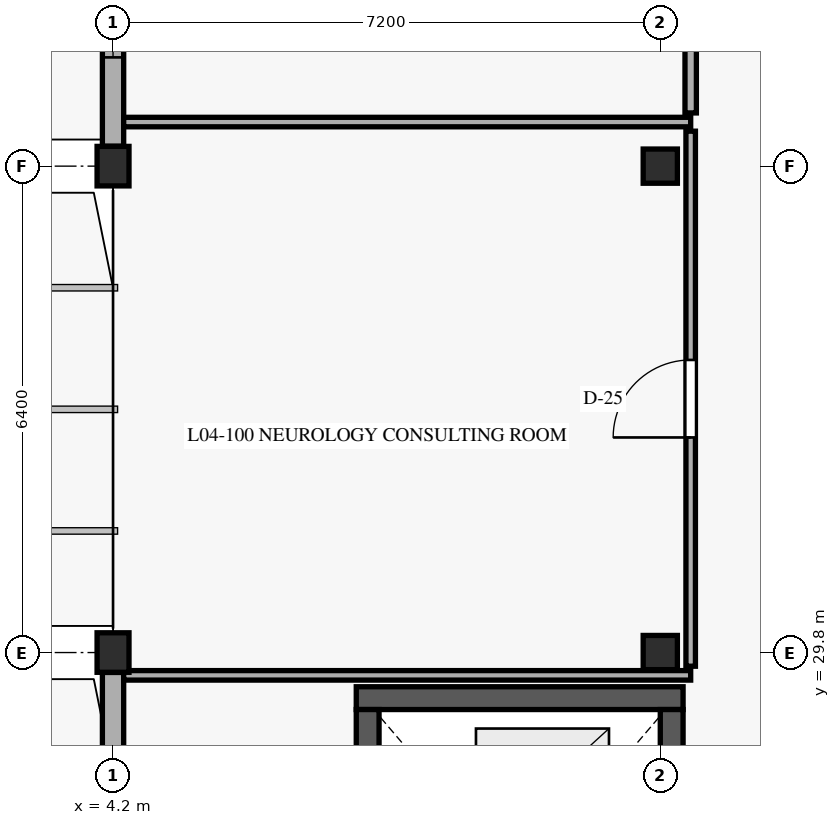
"""IFC4 building model, lengths in metres.
Left out: names, types, materials, properties, quantities, classifications, styles, units other than length and angle.
Written with IfcOpenShell. Run it as: python <this file> out.ifc"""

import sys

from ifc_helpers import new_model, si_unit, direction, frame, frame_2d, origin, origin_with_axes, origin_2d, place, context, subcontext, project, spatial, rectangle, extrude, element, fill, save


model = new_model("IFC4")
c1 = context("Model", 3, precision=1e-05, world=origin(), true_north=direction((0.0, 1.0)))
c2 = subcontext(c1, "Body", "Model", "MODEL_VIEW")
j1 = project(units=[si_unit("LENGTHUNIT", "METRE"), si_unit("PLANEANGLEUNIT", "RADIAN")], contexts=[c1])
p1 = place(None, origin())
s1 = spatial("IfcSite", under=j1, at=p1, CompositionType="ELEMENT")
p2 = place(p1, origin())
s2 = spatial("IfcBuilding", under=s1, at=p2, CompositionType="ELEMENT")
p3 = place(p2, frame((0.0, 0.0, 13.5)))
s3 = spatial("IfcBuildingStorey", under=s2, at=p3, CompositionType="ELEMENT", Elevation=13.5)
for number, where, z_axis, x_axis in (
    (1, (4.2, 29.8, 0.0), (0.0, 0.0, 1.0), (1.0, 0.0, 0.0)),
    (2, (4.2, 36.2, 0.0), (0.0, 0.0, 1.0), (1.0, 0.0, 0.0)),
):
    element("IfcColumn", number, at=place(p3, frame(where, z_axis=z_axis, x_axis=x_axis)), inside=s3, PredefinedType="COLUMN", context=c2, shape_type="SweptSolid", body=[
        extrude(rectangle(XDim=0.42, YDim=0.52, at=origin_2d()), origin(), (0.0, 0.0, 1.0), 4.05),
    ])
for number, where, z_axis, x_axis in (
    (3, (11.4, 29.8, 0.0), (0.0, 0.0, 1.0), (1.0, 0.0, 0.0)),
    (4, (11.4, 36.2, 0.0), (0.0, 0.0, 1.0), (1.0, 0.0, 0.0)),
):
    element("IfcColumn", number, at=place(p3, frame(where, z_axis=z_axis, x_axis=x_axis)), inside=s3, PredefinedType="COLUMN", context=c2, shape_type="SweptSolid", body=[
        extrude(rectangle(XDim=0.45, YDim=0.45, at=origin_2d()), origin(), (0.0, 0.0, 1.0), 4.05),
    ])
p4 = place(p3, frame((11.7, 29.2, 0.0), z_axis=(0.0, 0.0, 1.0), x_axis=(-1.0, 0.0, 0.0)))
e5 = element("IfcWall", 5, at=p4, inside=s3, PredefinedType="SHEAR", context=c2, shape_type="SweptSolid", body=[
    extrude(rectangle(XDim=4.3, YDim=0.3, at=frame_2d((2.15, 0.0))), origin(), (0.0, 0.0, 1.0), 3.75),
])
p5 = place(p3, frame((7.55, 29.05, 0.0), z_axis=(0.0, 0.0, 1.0), x_axis=(0.0, -1.0, 0.0)))
e6 = element("IfcWall", 6, at=p5, inside=s3, PredefinedType="SHEAR", context=c2, shape_type="SweptSolid", body=[
    extrude(rectangle(XDim=11.7, YDim=0.3, at=frame_2d((5.85, 0.0))), origin(), (0.0, 0.0, 1.0), 3.75),
])
p6 = place(p3, frame((11.55, 17.35, 0.0), z_axis=(0.0, 0.0, 1.0), x_axis=(0.0, 1.0, 0.0)))
e7 = element("IfcWall", 7, at=p6, inside=s3, PredefinedType="SHEAR", context=c2, shape_type="SweptSolid", body=[
    extrude(rectangle(XDim=11.7, YDim=0.3, at=frame_2d((5.85, 0.0))), origin(), (0.0, 0.0, 1.0), 3.75),
])
p7 = place(p6, frame((0.2, 0.0, 0.0)))
e8 = element("IfcOpeningElement", 8, at=p7, cuts=e7, PredefinedType="OPENING", context=c2, shape_type="SweptSolid", body=[
    extrude(rectangle(XDim=1.1, YDim=2.2, at=frame_2d((0.55, 1.1))), frame((0.0, 0.16, 0.0), z_axis=(0.0, -1.0, 0.0), x_axis=(1.0, 0.0, 0.0)), (0.0, 0.0, 1.0), 0.32),
])
p8 = place(p6, frame((7.875, 0.0, 0.0)))
e9 = element("IfcOpeningElement", 9, at=p8, cuts=e7, PredefinedType="OPENING", context=c2, shape_type="SweptSolid", body=[
    extrude(rectangle(XDim=1.15, YDim=2.2, at=frame_2d((0.575, 1.1))), frame((0.0, 0.16, 0.0), z_axis=(0.0, -1.0, 0.0), x_axis=(1.0, 0.0, 0.0)), (0.0, 0.0, 1.0), 0.32),
])
p9 = place(p6, frame((10.14, 0.0, 0.0)))
e10 = element("IfcOpeningElement", 10, at=p9, cuts=e7, PredefinedType="OPENING", context=c2, shape_type="SweptSolid", body=[
    extrude(rectangle(XDim=1.02, YDim=2.15, at=frame_2d((0.51, 1.075))), frame((0.0, 0.16, 0.0), z_axis=(0.0, -1.0, 0.0), x_axis=(1.0, 0.0, 0.0)), (0.0, 0.0, 1.0), 0.32),
])
p10 = place(p3, frame((4.2, 29.538, 0.0), z_axis=(0.0, 0.0, 1.0), x_axis=(0.0, -1.0, 0.0)))
e11 = element("IfcWall", 11, at=p10, inside=s3, PredefinedType="SOLIDWALL", context=c2, shape_type="SweptSolid", body=[
    extrude(rectangle(XDim=5.876, YDim=0.28, at=frame_2d((2.938, 0.0))), origin(), (0.0, 0.0, 1.0), 3.33),
])
p11 = place(p10, frame((1.034, 0.0, 0.88)))
e12 = element("IfcOpeningElement", 12, at=p11, cuts=e11, PredefinedType="OPENING", context=c2, shape_type="SweptSolid", body=[
    extrude(rectangle(XDim=1.85, YDim=1.65, at=frame_2d((0.925, 0.825))), frame((0.0, 0.15, 0.0), z_axis=(0.0, -1.0, 0.0), x_axis=(1.0, 0.0, 0.0)), (0.0, 0.0, 1.0), 0.3),
])
p12 = place(p10, frame((3.207, 0.0, 0.88)))
e13 = element("IfcOpeningElement", 13, at=p12, cuts=e11, PredefinedType="OPENING", context=c2, shape_type="SweptSolid", body=[
    extrude(rectangle(XDim=1.42, YDim=1.9, at=frame_2d((0.71, 0.95))), frame((0.0, 0.15, 0.0), z_axis=(0.0, -1.0, 0.0), x_axis=(1.0, 0.0, 0.0)), (0.0, 0.0, 1.0), 0.3),
])
p13 = place(p3, frame((4.2, 42.338, 0.0), z_axis=(0.0, 0.0, 1.0), x_axis=(0.0, -1.0, 0.0)))
e14 = element("IfcWall", 14, at=p13, inside=s3, PredefinedType="SOLIDWALL", context=c2, shape_type="SweptSolid", body=[
    extrude(rectangle(XDim=5.876, YDim=0.28, at=frame_2d((2.938, 0.0))), origin(), (0.0, 0.0, 1.0), 3.33),
])
p14 = place(p13, frame((1.534, 0.0, 0.88)))
e15 = element("IfcOpeningElement", 15, at=p14, cuts=e14, PredefinedType="OPENING", context=c2, shape_type="SweptSolid", body=[
    extrude(rectangle(XDim=0.85, YDim=2.1, at=frame_2d((0.425, 1.05))), frame((0.0, 0.15, 0.0), z_axis=(0.0, -1.0, 0.0), x_axis=(1.0, 0.0, 0.0)), (0.0, 0.0, 1.0), 0.3),
])
p15 = place(p13, frame((3.127, 0.0, 0.88)))
e16 = element("IfcOpeningElement", 16, at=p15, cuts=e14, PredefinedType="OPENING", context=c2, shape_type="SweptSolid", body=[
    extrude(rectangle(XDim=1.58, YDim=1.9, at=frame_2d((0.79, 0.95))), frame((0.0, 0.15, 0.0), z_axis=(0.0, -1.0, 0.0), x_axis=(1.0, 0.0, 0.0)), (0.0, 0.0, 1.0), 0.3),
])
p16 = place(p3, frame((11.8, 29.62, 0.0), z_axis=(0.0, 0.0, 1.0), x_axis=(0.0, 1.0, 0.0)))
e17 = element("IfcWall", 17, at=p16, inside=s3, PredefinedType="PARTITIONING", context=c2, shape_type="SweptSolid", body=[
    extrude(rectangle(XDim=7.04, YDim=0.125, at=frame_2d((3.52, 0.0))), origin(), (0.0, 0.0, 1.0), 3.345),
])
p17 = place(p16, frame((3.01, 0.0, 0.0)))
e18 = element("IfcOpeningElement", 18, at=p17, cuts=e17, PredefinedType="OPENING", context=c2, shape_type="SweptSolid", body=[
    extrude(rectangle(XDim=1.02, YDim=2.18, at=frame_2d((0.51, 1.09))), frame((0.0, 0.073, 0.0), z_axis=(0.0, -1.0, 0.0), x_axis=(1.0, 0.0, 0.0)), (0.0, 0.0, 1.0), 0.145),
])
for number, where, z_axis, x_axis in (
    (19, (4.34, 36.78, 0.0), (0.0, 0.0, 1.0), (1.0, 0.0, 0.0)),
    (20, (4.34, 29.5, 0.0), (0.0, 0.0, 1.0), (1.0, 0.0, 0.0)),
):
    element("IfcWall", number, at=place(p3, frame(where, z_axis=z_axis, x_axis=x_axis)), inside=s3, PredefinedType="PARTITIONING", context=c2, shape_type="SweptSolid", body=[
        extrude(rectangle(XDim=7.46, YDim=0.125, at=frame_2d((3.73, 0.0))), origin(), (0.0, 0.0, 1.0), 3.325),
    ])
p18 = place(p3, frame((11.8, 36.9, 0.0), z_axis=(0.0, 0.0, 1.0), x_axis=(0.0, 1.0, 0.0)))
e21 = element("IfcWall", 21, at=p18, inside=s3, PredefinedType="PARTITIONING", context=c2, shape_type="SweptSolid", body=[
    extrude(rectangle(XDim=5.56, YDim=0.15, at=frame_2d((2.78, 0.0))), origin(), (0.0, 0.0, 1.0), 3.745),
])
p19 = place(p18, frame((2.365, 0.0, 0.0)))
e22 = element("IfcOpeningElement", 22, at=p19, cuts=e21, PredefinedType="OPENING", context=c2, shape_type="SweptSolid", body=[
    extrude(rectangle(XDim=0.98, YDim=2.12, at=frame_2d((0.49, 1.06))), frame((0.0, 0.085, 0.0), z_axis=(0.0, -1.0, 0.0), x_axis=(1.0, 0.0, 0.0)), (0.0, 0.0, 1.0), 0.17),
])
p20 = place(p15, origin_with_axes())
e23 = element("IfcWindow", 23, at=p20, inside=s3, PartitioningType="SINGLE_PANEL", PredefinedType="WINDOW", context=c2, shape_type="SweptSolid", body=[
    extrude(rectangle(XDim=1.58, YDim=1.9, at=frame_2d((0.79, 0.95))), frame((0.0, 0.03, 0.0), z_axis=(0.0, -1.0, 0.0), x_axis=(1.0, 0.0, 0.0)), (0.0, 0.0, 1.0), 0.06),
])
fill(e16, e23)
p21 = place(p17, origin_with_axes())
e24 = element("IfcDoor", 24, at=p21, inside=s3, OperationType="SINGLE_SWING_LEFT", PredefinedType="DOOR", context=c2, shape_type="SweptSolid", body=[
    extrude(rectangle(XDim=1.02, YDim=2.18, at=frame_2d((0.51, 1.09))), frame((0.0, 0.025, 0.0), z_axis=(0.0, -1.0, 0.0), x_axis=(1.0, 0.0, 0.0)), (0.0, 0.0, 1.0), 0.05),
])
fill(e18, e24)
save(model, sys.argv[1])
